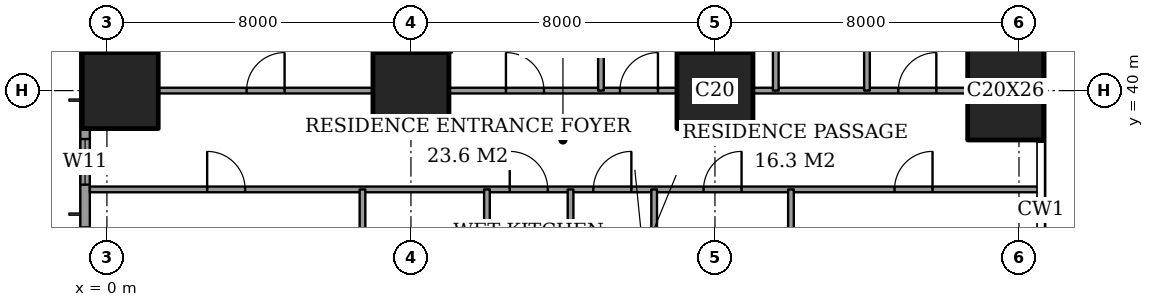
"""IFC4 building model, lengths in metres.
Left out: names, types, materials, properties, quantities, classifications, styles, units other than length and angle.
Written with IfcOpenShell. Run it as: python <this file> out.ifc"""

import sys

from ifc_helpers import new_model, si_unit, direction, frame, frame_2d, origin, origin_2d, place, context, subcontext, project, spatial, rectangle, extrude, element, fill, save


model = new_model("IFC4")
c1 = context("Model", 3, precision=1e-05, world=origin(), true_north=direction((0.0, 1.0)))
c2 = subcontext(c1, "Body", "Model", "MODEL_VIEW")
j1 = project(units=[si_unit("LENGTHUNIT", "METRE"), si_unit("PLANEANGLEUNIT", "RADIAN")], contexts=[c1])
p1 = place(None, origin())
s1 = spatial("IfcSite", under=j1, at=p1, CompositionType="ELEMENT")
p2 = place(p1, origin())
s2 = spatial("IfcBuilding", under=s1, at=p2, CompositionType="ELEMENT")
p3 = place(p2, frame((0.0, 0.0, 153.8)))
s3 = spatial("IfcBuildingStorey", under=s2, at=p3, CompositionType="ELEMENT", Elevation=153.8)
for number, where, z_axis, x_axis in (
    (1, (0.35, 40.0, 0.0), (0.0, 0.0, 1.0), (1.0, 0.0, 0.0)),
    (2, (8.0, 40.0, 0.0), (0.0, 0.0, 1.0), (1.0, 0.0, 0.0)),
    (3, (16.0, 40.0, 0.0), (0.0, 0.0, 1.0), (1.0, 0.0, 0.0)),
):
    element("IfcColumn", number, at=place(p3, frame(where, z_axis=z_axis, x_axis=x_axis)), inside=s3, PredefinedType="COLUMN", context=c2, shape_type="SweptSolid", body=[
        extrude(rectangle(XDim=2.0, YDim=2.0, at=origin_2d()), origin(), (0.0, 0.0, 1.0), 3.6),
    ])
p4 = place(p3, frame((23.65, 40.0, 0.0), z_axis=(0.0, 0.0, 1.0), x_axis=(1.0, 0.0, 0.0)))
e4 = element("IfcColumn", 4, at=p4, inside=s3, PredefinedType="COLUMN", context=c2, shape_type="SweptSolid", body=[
    extrude(rectangle(XDim=2.0, YDim=2.6, at=origin_2d()), origin(), (0.0, 0.0, 1.0), 3.6),
])
p5 = place(p3, frame((-0.575, 44.825, 0.0), z_axis=(0.0, 0.0, 1.0), x_axis=(0.0, -1.0, 0.0)))
e5 = element("IfcWall", 5, at=p5, inside=s3, PredefinedType="SOLIDWALL", context=c2, shape_type="SweptSolid", body=[
    extrude(rectangle(XDim=41.65, YDim=0.25, at=frame_2d((20.825, 0.0))), origin(), (0.0, 0.0, 1.0), 3.6),
])
p6 = place(p5, frame((0.775, 0.0, 0.4)))
e6 = element("IfcOpeningElement", 6, at=p6, cuts=e5, PredefinedType="OPENING", context=c2, shape_type="SweptSolid", body=[
    extrude(rectangle(XDim=2.4, YDim=2.2, at=frame_2d((1.2, 1.1))), frame((0.0, 0.135, 0.0), z_axis=(0.0, -1.0, 0.0), x_axis=(1.0, 0.0, 0.0)), (0.0, 0.0, 1.0), 0.27),
])
p7 = place(p5, frame((6.1, 0.0, 0.4)))
e7 = element("IfcOpeningElement", 7, at=p7, cuts=e5, PredefinedType="OPENING", context=c2, shape_type="SweptSolid", body=[
    extrude(rectangle(XDim=1.2, YDim=2.2, at=frame_2d((0.6, 1.1))), frame((0.0, 0.135, 0.0), z_axis=(0.0, -1.0, 0.0), x_axis=(1.0, 0.0, 0.0)), (0.0, 0.0, 1.0), 0.27),
])
p8 = place(p5, frame((8.425, 0.0, 0.4)))
e8 = element("IfcOpeningElement", 8, at=p8, cuts=e5, PredefinedType="OPENING", context=c2, shape_type="SweptSolid", body=[
    extrude(rectangle(XDim=2.4, YDim=2.2, at=frame_2d((1.2, 1.1))), frame((0.0, 0.135, 0.0), z_axis=(0.0, -1.0, 0.0), x_axis=(1.0, 0.0, 0.0)), (0.0, 0.0, 1.0), 0.27),
])
p9 = place(p5, frame((15.625, 0.0, 0.4)))
e9 = element("IfcOpeningElement", 9, at=p9, cuts=e5, PredefinedType="OPENING", context=c2, shape_type="SweptSolid", body=[
    extrude(rectangle(XDim=2.4, YDim=2.2, at=frame_2d((1.2, 1.1))), frame((0.0, 0.135, 0.0), z_axis=(0.0, -1.0, 0.0), x_axis=(1.0, 0.0, 0.0)), (0.0, 0.0, 1.0), 0.27),
])
p10 = place(p5, frame((23.625, 0.0, 0.4)))
e10 = element("IfcOpeningElement", 10, at=p10, cuts=e5, PredefinedType="OPENING", context=c2, shape_type="SweptSolid", body=[
    extrude(rectangle(XDim=2.4, YDim=2.2, at=frame_2d((1.2, 1.1))), frame((0.0, 0.135, 0.0), z_axis=(0.0, -1.0, 0.0), x_axis=(1.0, 0.0, 0.0)), (0.0, 0.0, 1.0), 0.27),
])
p11 = place(p5, frame((30.825, 0.0, 0.4)))
e11 = element("IfcOpeningElement", 11, at=p11, cuts=e5, PredefinedType="OPENING", context=c2, shape_type="SweptSolid", body=[
    extrude(rectangle(XDim=2.4, YDim=2.2, at=frame_2d((1.2, 1.1))), frame((0.0, 0.135, 0.0), z_axis=(0.0, -1.0, 0.0), x_axis=(1.0, 0.0, 0.0)), (0.0, 0.0, 1.0), 0.27),
])
p12 = place(p5, frame((34.5, 0.0, 0.4)))
e12 = element("IfcOpeningElement", 12, at=p12, cuts=e5, PredefinedType="OPENING", context=c2, shape_type="SweptSolid", body=[
    extrude(rectangle(XDim=1.2, YDim=2.2, at=frame_2d((0.6, 1.1))), frame((0.0, 0.135, 0.0), z_axis=(0.0, -1.0, 0.0), x_axis=(1.0, 0.0, 0.0)), (0.0, 0.0, 1.0), 0.27),
])
p13 = place(p5, frame((38.475, 0.0, 0.4)))
e13 = element("IfcOpeningElement", 13, at=p13, cuts=e5, PredefinedType="OPENING", context=c2, shape_type="SweptSolid", body=[
    extrude(rectangle(XDim=2.4, YDim=2.2, at=frame_2d((1.2, 1.1))), frame((0.0, 0.135, 0.0), z_axis=(0.0, -1.0, 0.0), x_axis=(1.0, 0.0, 0.0)), (0.0, 0.0, 1.0), 0.27),
])
p14 = place(p3, frame((-0.45, 37.4, 0.0), z_axis=(0.0, 0.0, 1.0), x_axis=(1.0, 0.0, 0.0)))
e14 = element("IfcWall", 14, at=p14, inside=s3, PredefinedType="PARTITIONING", context=c2, shape_type="SweptSolid", body=[
    extrude(rectangle(XDim=25.011, YDim=0.15, at=frame_2d((12.505, 0.0))), origin(), (0.0, 0.0, 1.0), 3.35),
])
p15 = place(p14, frame((13.25, 0.0, 0.0)))
e15 = element("IfcOpeningElement", 15, at=p15, cuts=e14, PredefinedType="OPENING", context=c2, shape_type="SweptSolid", body=[
    extrude(rectangle(XDim=1.0, YDim=2.1, at=frame_2d((0.5, 1.05))), frame((0.0, 0.085, 0.0), z_axis=(0.0, -1.0, 0.0), x_axis=(1.0, 0.0, 0.0)), (0.0, 0.0, 1.0), 0.17),
])
p16 = place(p14, frame((3.087, 0.0, 0.0)))
e16 = element("IfcOpeningElement", 16, at=p16, cuts=e14, PredefinedType="OPENING", context=c2, shape_type="SweptSolid", body=[
    extrude(rectangle(XDim=1.0, YDim=2.1, at=frame_2d((0.5, 1.05))), frame((0.0, 0.085, 0.0), z_axis=(0.0, -1.0, 0.0), x_axis=(1.0, 0.0, 0.0)), (0.0, 0.0, 1.0), 0.17),
])
p17 = place(p14, frame((11.05, 0.0, 0.0)))
e17 = element("IfcOpeningElement", 17, at=p17, cuts=e14, PredefinedType="OPENING", context=c2, shape_type="SweptSolid", body=[
    extrude(rectangle(XDim=1.0, YDim=2.1, at=frame_2d((0.5, 1.05))), frame((0.0, 0.085, 0.0), z_axis=(0.0, -1.0, 0.0), x_axis=(1.0, 0.0, 0.0)), (0.0, 0.0, 1.0), 0.17),
])
p18 = place(p14, frame((16.15, 0.0, 0.0)))
e18 = element("IfcOpeningElement", 18, at=p18, cuts=e14, PredefinedType="OPENING", context=c2, shape_type="SweptSolid", body=[
    extrude(rectangle(XDim=1.0, YDim=2.1, at=frame_2d((0.5, 1.05))), frame((0.0, 0.085, 0.0), z_axis=(0.0, -1.0, 0.0), x_axis=(1.0, 0.0, 0.0)), (0.0, 0.0, 1.0), 0.17),
])
p19 = place(p14, frame((21.175, 0.0, 0.0)))
e19 = element("IfcOpeningElement", 19, at=p19, cuts=e14, PredefinedType="OPENING", context=c2, shape_type="SweptSolid", body=[
    extrude(rectangle(XDim=1.0, YDim=2.1, at=frame_2d((0.5, 1.05))), frame((0.0, 0.085, 0.0), z_axis=(0.0, -1.0, 0.0), x_axis=(1.0, 0.0, 0.0)), (0.0, 0.0, 1.0), 0.17),
])
p20 = place(p3, frame((1.35, 40.0, 0.0), z_axis=(0.0, 0.0, 1.0), x_axis=(1.0, 0.0, 0.0)))
e20 = element("IfcWall", 20, at=p20, inside=s3, PredefinedType="PARTITIONING", context=c2, shape_type="SweptSolid", body=[
    extrude(rectangle(XDim=5.65, YDim=0.15, at=frame_2d((2.825, 0.0))), origin(), (0.0, 0.0, 1.0), 3.35),
])
p21 = place(p20, frame((2.325, 0.0, 0.0)))
e21 = element("IfcOpeningElement", 21, at=p21, cuts=e20, PredefinedType="OPENING", context=c2, shape_type="SweptSolid", body=[
    extrude(rectangle(XDim=1.0, YDim=2.1, at=frame_2d((0.5, 1.05))), frame((0.0, 0.085, 0.0), z_axis=(0.0, -1.0, 0.0), x_axis=(1.0, 0.0, 0.0)), (0.0, 0.0, 1.0), 0.17),
])
p22 = place(p3, frame((9.0, 40.0, 0.0), z_axis=(0.0, 0.0, 1.0), x_axis=(1.0, 0.0, 0.0)))
e22 = element("IfcWall", 22, at=p22, inside=s3, PredefinedType="PARTITIONING", context=c2, shape_type="SweptSolid", body=[
    extrude(rectangle(XDim=6.0, YDim=0.15, at=frame_2d((3.0, 0.0))), origin(), (0.0, 0.0, 1.0), 3.35),
])
p23 = place(p22, frame((1.5, 0.0, 0.0)))
e23 = element("IfcOpeningElement", 23, at=p23, cuts=e22, PredefinedType="OPENING", context=c2, shape_type="SweptSolid", body=[
    extrude(rectangle(XDim=1.0, YDim=2.1, at=frame_2d((0.5, 1.05))), frame((0.0, 0.085, 0.0), z_axis=(0.0, -1.0, 0.0), x_axis=(1.0, 0.0, 0.0)), (0.0, 0.0, 1.0), 0.17),
])
p24 = place(p22, frame((4.5, 0.0, 0.0)))
e24 = element("IfcOpeningElement", 24, at=p24, cuts=e22, PredefinedType="OPENING", context=c2, shape_type="SweptSolid", body=[
    extrude(rectangle(XDim=1.0, YDim=2.1, at=frame_2d((0.5, 1.05))), frame((0.0, 0.085, 0.0), z_axis=(0.0, -1.0, 0.0), x_axis=(1.0, 0.0, 0.0)), (0.0, 0.0, 1.0), 0.17),
])
p25 = place(p3, frame((17.0, 40.0, 0.0), z_axis=(0.0, 0.0, 1.0), x_axis=(1.0, 0.0, 0.0)))
e25 = element("IfcWall", 25, at=p25, inside=s3, PredefinedType="PARTITIONING", context=c2, shape_type="SweptSolid", body=[
    extrude(rectangle(XDim=5.65, YDim=0.15, at=frame_2d((2.825, 0.0))), origin(), (0.0, 0.0, 1.0), 3.35),
])
p26 = place(p25, frame((3.825, 0.0, 0.0)))
e26 = element("IfcOpeningElement", 26, at=p26, cuts=e25, PredefinedType="OPENING", context=c2, shape_type="SweptSolid", body=[
    extrude(rectangle(XDim=1.0, YDim=2.1, at=frame_2d((0.5, 1.05))), frame((0.0, 0.085, 0.0), z_axis=(0.0, -1.0, 0.0), x_axis=(1.0, 0.0, 0.0)), (0.0, 0.0, 1.0), 0.17),
])
p27 = place(p3, frame((6.725, 33.2, 0.0), z_axis=(0.0, 0.0, 1.0), x_axis=(0.0, 1.0, 0.0)))
e27 = element("IfcWall", 27, at=p27, inside=s3, PredefinedType="PARTITIONING", context=c2, shape_type="SweptSolid", body=[
    extrude(rectangle(XDim=4.2, YDim=0.15, at=frame_2d((2.1, 0.0))), origin(), (0.0, 0.0, 1.0), 3.35),
])
p28 = place(p27, frame((2.1, 0.0, 0.0)))
e28 = element("IfcOpeningElement", 28, at=p28, cuts=e27, PredefinedType="OPENING", context=c2, shape_type="SweptSolid", body=[
    extrude(rectangle(XDim=0.9, YDim=2.1, at=frame_2d((0.45, 1.05))), frame((0.0, 0.085, 0.0), z_axis=(0.0, -1.0, 0.0), x_axis=(1.0, 0.0, 0.0)), (0.0, 0.0, 1.0), 0.17),
])
p29 = place(p3, frame((10.0, 28.0, 0.0), z_axis=(0.0, 0.0, 1.0), x_axis=(0.0, 1.0, 0.0)))
e29 = element("IfcWall", 29, at=p29, inside=s3, PredefinedType="PARTITIONING", context=c2, shape_type="SweptSolid", body=[
    extrude(rectangle(XDim=9.4, YDim=0.15, at=frame_2d((4.7, 0.0))), origin(), (0.0, 0.0, 1.0), 3.35),
])
p30 = place(p29, frame((0.5, 0.0, 0.0)))
e30 = element("IfcOpeningElement", 30, at=p30, cuts=e29, PredefinedType="OPENING", context=c2, shape_type="SweptSolid", body=[
    extrude(rectangle(XDim=1.0, YDim=2.1, at=frame_2d((0.5, 1.05))), frame((0.0, 0.085, 0.0), z_axis=(0.0, -1.0, 0.0), x_axis=(1.0, 0.0, 0.0)), (0.0, 0.0, 1.0), 0.17),
])
p31 = place(p3, frame((12.2, 30.0, 0.0), z_axis=(0.0, 0.0, 1.0), x_axis=(0.0, 1.0, 0.0)))
e31 = element("IfcWall", 31, at=p31, inside=s3, PredefinedType="PARTITIONING", context=c2, shape_type="SweptSolid", body=[
    extrude(rectangle(XDim=7.4, YDim=0.15, at=frame_2d((3.7, 0.0))), origin(), (0.0, 0.0, 1.0), 3.35),
])
p32 = place(p3, frame((13.0, 40.0, 0.0), z_axis=(0.0, 0.0, 1.0), x_axis=(0.0, 1.0, 0.0)))
e32 = element("IfcWall", 32, at=p32, inside=s3, PredefinedType="PARTITIONING", context=c2, shape_type="SweptSolid", body=[
    extrude(rectangle(XDim=8.45, YDim=0.15, at=frame_2d((4.225, 0.0))), origin(), (0.0, 0.0, 1.0), 3.35),
])
p33 = place(p3, frame((14.4, 30.0, 0.0), z_axis=(0.0, 0.0, 1.0), x_axis=(0.0, 1.0, 0.0)))
e33 = element("IfcWall", 33, at=p33, inside=s3, PredefinedType="PARTITIONING", context=c2, shape_type="SweptSolid", body=[
    extrude(rectangle(XDim=7.4, YDim=0.15, at=frame_2d((3.7, 0.0))), origin(), (0.0, 0.0, 1.0), 3.35),
])
p34 = place(p3, frame((17.6, 40.0, 0.0), z_axis=(0.0, 0.0, 1.0), x_axis=(0.0, 1.0, 0.0)))
e34 = element("IfcWall", 34, at=p34, inside=s3, PredefinedType="PARTITIONING", context=c2, shape_type="SweptSolid", body=[
    extrude(rectangle(XDim=8.45, YDim=0.15, at=frame_2d((4.225, 0.0))), origin(), (0.0, 0.0, 1.0), 3.35),
])
p35 = place(p3, frame((18.0, 32.0, 0.0), z_axis=(0.0, 0.0, 1.0), x_axis=(0.0, 1.0, 0.0)))
e35 = element("IfcWall", 35, at=p35, inside=s3, PredefinedType="PARTITIONING", context=c2, shape_type="SweptSolid", body=[
    extrude(rectangle(XDim=5.4, YDim=0.15, at=frame_2d((2.7, 0.0))), origin(), (0.0, 0.0, 1.0), 3.35),
])
p36 = place(p3, frame((20.0, 40.0, 0.0), z_axis=(0.0, 0.0, 1.0), x_axis=(0.0, 1.0, 0.0)))
e36 = element("IfcWall", 36, at=p36, inside=s3, PredefinedType="PARTITIONING", context=c2, shape_type="SweptSolid", body=[
    extrude(rectangle(XDim=8.45, YDim=0.15, at=frame_2d((4.225, 0.0))), origin(), (0.0, 0.0, 1.0), 3.35),
])
p37 = place(p36, frame((3.775, 0.0, 0.0)))
e37 = element("IfcOpeningElement", 37, at=p37, cuts=e36, PredefinedType="OPENING", context=c2, shape_type="SweptSolid", body=[
    extrude(rectangle(XDim=0.9, YDim=2.1, at=frame_2d((0.45, 1.05))), frame((0.0, 0.085, 0.0), z_axis=(0.0, -1.0, 0.0), x_axis=(1.0, 0.0, 0.0)), (0.0, 0.0, 1.0), 0.17),
])
p38 = place(p7, origin())
e38 = element("IfcWindow", 38, at=p38, inside=s3, PartitioningType="SINGLE_PANEL", PredefinedType="WINDOW", context=c2, shape_type="SweptSolid", body=[
    extrude(rectangle(XDim=1.2, YDim=2.2, at=frame_2d((0.6, 1.1))), frame((0.0, 0.03, 0.0), z_axis=(0.0, -1.0, 0.0), x_axis=(1.0, 0.0, 0.0)), (0.0, 0.0, 1.0), 0.06),
])
fill(e7, e38)
p39 = place(p21, origin())
e39 = element("IfcDoor", 39, at=p39, inside=s3, OperationType="SINGLE_SWING_LEFT", PredefinedType="DOOR", context=c2, shape_type="SweptSolid", body=[
    extrude(rectangle(XDim=1.0, YDim=2.1, at=frame_2d((0.5, 1.05))), frame((0.0, 0.025, 0.0), z_axis=(0.0, -1.0, 0.0), x_axis=(1.0, 0.0, 0.0)), (0.0, 0.0, 1.0), 0.05),
])
fill(e21, e39)
p40 = place(p23, origin())
e40 = element("IfcDoor", 40, at=p40, inside=s3, OperationType="SINGLE_SWING_RIGHT", PredefinedType="DOOR", context=c2, shape_type="SweptSolid", body=[
    extrude(rectangle(XDim=1.0, YDim=2.1, at=frame_2d((0.5, 1.05))), frame((0.0, 0.025, 0.0), z_axis=(0.0, -1.0, 0.0), x_axis=(1.0, 0.0, 0.0)), (0.0, 0.0, 1.0), 0.05),
])
fill(e23, e40)
p41 = place(p24, origin())
e41 = element("IfcDoor", 41, at=p41, inside=s3, OperationType="SINGLE_SWING_LEFT", PredefinedType="DOOR", context=c2, shape_type="SweptSolid", body=[
    extrude(rectangle(XDim=1.0, YDim=2.1, at=frame_2d((0.5, 1.05))), frame((0.0, 0.025, 0.0), z_axis=(0.0, -1.0, 0.0), x_axis=(1.0, 0.0, 0.0)), (0.0, 0.0, 1.0), 0.05),
])
fill(e24, e41)
p42 = place(p26, origin())
e42 = element("IfcDoor", 42, at=p42, inside=s3, OperationType="SINGLE_SWING_LEFT", PredefinedType="DOOR", context=c2, shape_type="SweptSolid", body=[
    extrude(rectangle(XDim=1.0, YDim=2.1, at=frame_2d((0.5, 1.05))), frame((0.0, 0.025, 0.0), z_axis=(0.0, -1.0, 0.0), x_axis=(1.0, 0.0, 0.0)), (0.0, 0.0, 1.0), 0.05),
])
fill(e26, e42)
p43 = place(p15, origin())
e43 = element("IfcDoor", 43, at=p43, inside=s3, OperationType="SINGLE_SWING_LEFT", PredefinedType="DOOR", context=c2, shape_type="SweptSolid", body=[
    extrude(rectangle(XDim=1.0, YDim=2.1, at=frame_2d((0.5, 1.05))), frame((0.0, 0.025, 0.0), z_axis=(0.0, -1.0, 0.0), x_axis=(1.0, 0.0, 0.0)), (0.0, 0.0, 1.0), 0.05),
])
fill(e15, e43)
p44 = place(p16, origin())
e44 = element("IfcDoor", 44, at=p44, inside=s3, OperationType="SINGLE_SWING_RIGHT", PredefinedType="DOOR", context=c2, shape_type="SweptSolid", body=[
    extrude(rectangle(XDim=1.0, YDim=2.1, at=frame_2d((0.5, 1.05))), frame((0.0, 0.025, 0.0), z_axis=(0.0, -1.0, 0.0), x_axis=(1.0, 0.0, 0.0)), (0.0, 0.0, 1.0), 0.05),
])
fill(e16, e44)
p45 = place(p17, origin())
e45 = element("IfcDoor", 45, at=p45, inside=s3, OperationType="SINGLE_SWING_RIGHT", PredefinedType="DOOR", context=c2, shape_type="SweptSolid", body=[
    extrude(rectangle(XDim=1.0, YDim=2.1, at=frame_2d((0.5, 1.05))), frame((0.0, 0.025, 0.0), z_axis=(0.0, -1.0, 0.0), x_axis=(1.0, 0.0, 0.0)), (0.0, 0.0, 1.0), 0.05),
])
fill(e17, e45)
p46 = place(p18, origin())
e46 = element("IfcDoor", 46, at=p46, inside=s3, OperationType="SINGLE_SWING_LEFT", PredefinedType="DOOR", context=c2, shape_type="SweptSolid", body=[
    extrude(rectangle(XDim=1.0, YDim=2.1, at=frame_2d((0.5, 1.05))), frame((0.0, 0.025, 0.0), z_axis=(0.0, -1.0, 0.0), x_axis=(1.0, 0.0, 0.0)), (0.0, 0.0, 1.0), 0.05),
])
fill(e18, e46)
p47 = place(p19, origin())
e47 = element("IfcDoor", 47, at=p47, inside=s3, OperationType="SINGLE_SWING_LEFT", PredefinedType="DOOR", context=c2, shape_type="SweptSolid", body=[
    extrude(rectangle(XDim=1.0, YDim=2.1, at=frame_2d((0.5, 1.05))), frame((0.0, 0.025, 0.0), z_axis=(0.0, -1.0, 0.0), x_axis=(1.0, 0.0, 0.0)), (0.0, 0.0, 1.0), 0.05),
])
fill(e19, e47)
save(model, sys.argv[1])
